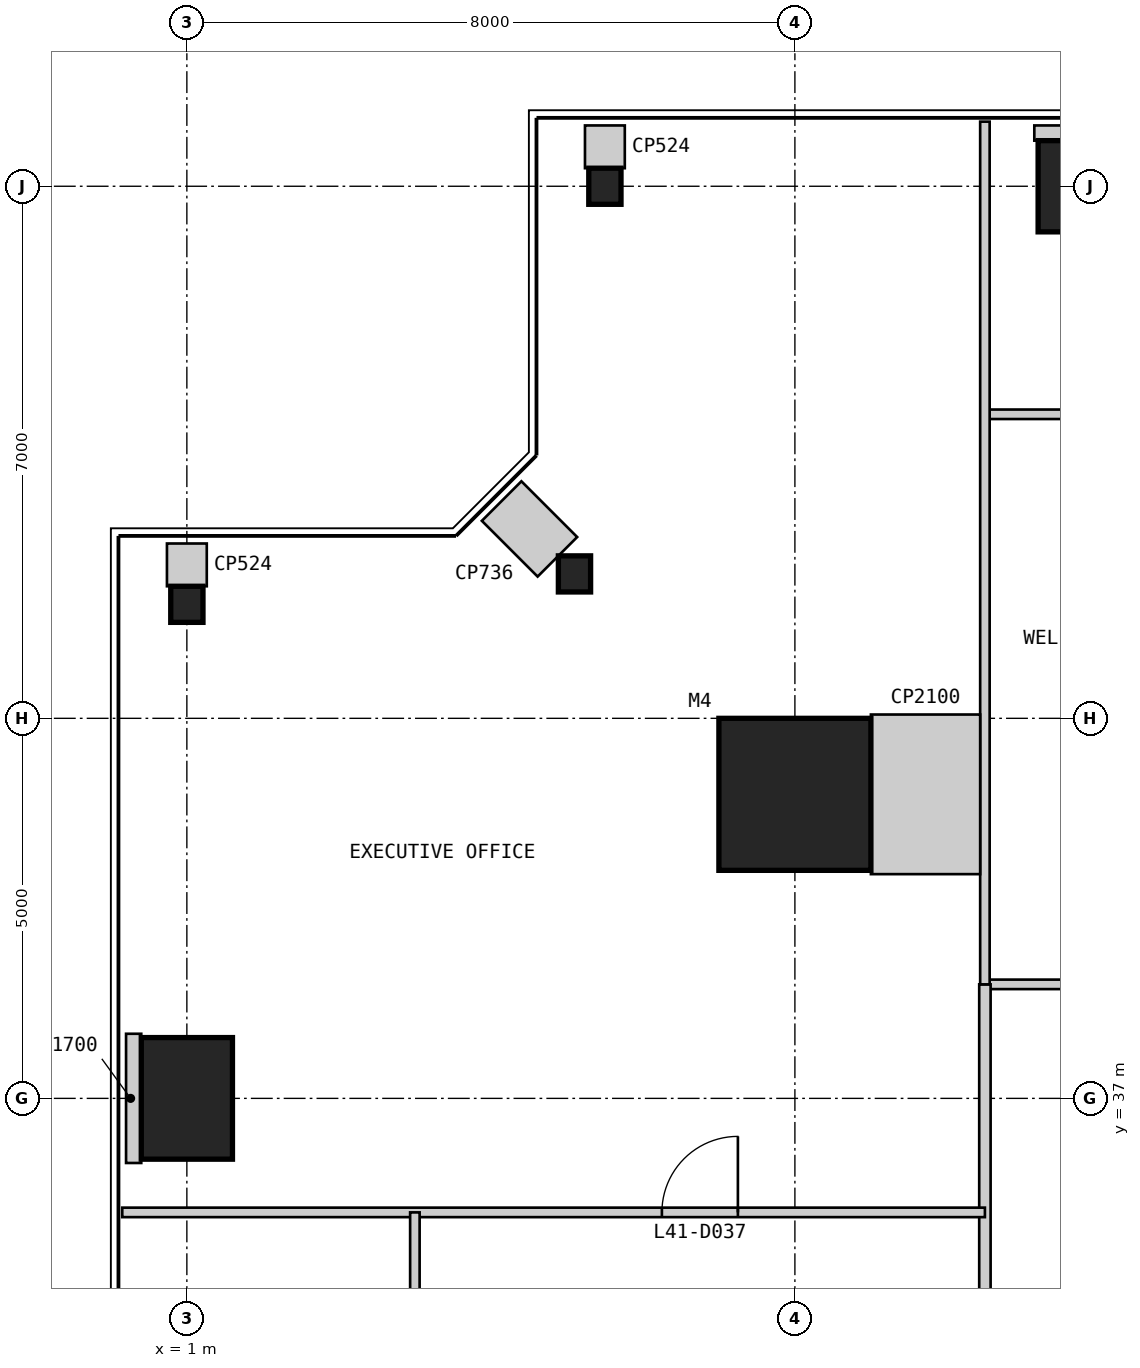
"""IFC4 building model, lengths in metres.
Left out: names, types, materials, properties, quantities, classifications, styles, units other than length and angle.
Written with IfcOpenShell. Run it as: python <this file> out.ifc"""

import sys

from ifc_helpers import new_model, si_unit, direction, frame, frame_2d, origin, origin_2d, place, context, subcontext, project, spatial, rectangle, i_section, extrude, element, fill, save


model = new_model("IFC4")
c1 = context("Model", 3, precision=1e-05, world=origin(), true_north=direction((0.0, 1.0)))
c2 = subcontext(c1, "Body", "Model", "MODEL_VIEW")
j1 = project(units=[si_unit("LENGTHUNIT", "METRE"), si_unit("PLANEANGLEUNIT", "RADIAN")], contexts=[c1])
p1 = place(None, origin())
s1 = spatial("IfcSite", under=j1, at=p1, CompositionType="ELEMENT")
p2 = place(p1, origin())
s2 = spatial("IfcBuilding", under=s1, at=p2, CompositionType="ELEMENT")
p3 = place(p2, frame((0.0, 0.0, 177.8)))
s3 = spatial("IfcBuildingStorey", under=s2, at=p3, CompositionType="ELEMENT", Elevation=177.8)
p4 = place(p3, frame((9.0, 41.0, 0.0), z_axis=(0.0, 0.0, 1.0), x_axis=(1.0, 0.0, 0.0)))
e1 = element("IfcColumn", 1, at=p4, inside=s3, PredefinedType="COLUMN", context=c2, shape_type="SweptSolid", body=[
    extrude(rectangle(XDim=2.0, YDim=2.0, at=origin_2d()), origin(), (0.0, 0.0, 1.0), 4.0),
])
p5 = place(p3, frame((13.0, 49.0, 0.0), z_axis=(0.0, 0.0, 1.0), x_axis=(1.0, 0.0, 0.0)))
e2 = element("IfcColumn", 2, at=p5, inside=s3, PredefinedType="COLUMN", context=c2, shape_type="SweptSolid", body=[
    extrude(rectangle(XDim=1.6, YDim=1.2, at=origin_2d()), origin(), (0.0, 0.0, 1.0), 4.0),
])
for number, where, z_axis, x_axis in (
    (3, (6.5, 49.0, 0.0), (0.0, 0.0, 1.0), (1.0, 0.0, 0.0)),
    (4, (6.1, 43.9, 0.0), (0.0, 0.0, 1.0), (1.0, 0.0, 0.0)),
    (5, (1.0, 43.5, 0.0), (0.0, 0.0, 1.0), (1.0, 0.0, 0.0)),
):
    element("IfcColumn", number, at=place(p3, frame(where, z_axis=z_axis, x_axis=x_axis)), inside=s3, PredefinedType="COLUMN", context=c2, shape_type="SweptSolid", body=[
        extrude(i_section(OverallWidth=0.424, OverallDepth=0.475, WebThickness=0.048, FlangeThickness=0.077, at=origin_2d()), origin(), (0.0, 0.0, 1.0), 4.0),
    ])
p6 = place(p3, frame((1.0, 37.0, 0.0), z_axis=(0.0, 0.0, 1.0), x_axis=(1.0, 0.0, 0.0)))
e6 = element("IfcColumn", 6, at=p6, inside=s3, PredefinedType="COLUMN", context=c2, shape_type="SweptSolid", body=[
    extrude(rectangle(XDim=1.2, YDim=1.6, at=origin_2d()), origin(), (0.0, 0.0, 1.0), 4.0),
])
p7 = place(p3, frame((35.5, 46.0, 0.0), z_axis=(0.0, 0.0, 1.0), x_axis=(-1.0, 0.0, 0.0)))
e7 = element("IfcWall", 7, at=p7, inside=s3, PredefinedType="PARTITIONING", context=c2, shape_type="SweptSolid", body=[
    extrude(rectangle(XDim=24.0, YDim=0.125, at=frame_2d((12.0, 0.0))), origin(), (0.0, 0.0, 1.0), 3.85),
])
p8 = place(p7, frame((16.05, 0.0, 0.0)))
e8 = element("IfcOpeningElement", 8, at=p8, cuts=e7, PredefinedType="OPENING", context=c2, shape_type="SweptSolid", body=[
    extrude(rectangle(XDim=0.9, YDim=2.2, at=frame_2d((0.45, 1.1))), frame((0.0, 0.073, 0.0), z_axis=(0.0, -1.0, 0.0), x_axis=(1.0, 0.0, 0.0)), (0.0, 0.0, 1.0), 0.145),
])
p9 = place(p7, frame((19.05, 0.0, 0.0)))
e9 = element("IfcOpeningElement", 9, at=p9, cuts=e7, PredefinedType="OPENING", context=c2, shape_type="SweptSolid", body=[
    extrude(rectangle(XDim=0.9, YDim=2.2, at=frame_2d((0.45, 1.1))), frame((0.0, 0.073, 0.0), z_axis=(0.0, -1.0, 0.0), x_axis=(1.0, 0.0, 0.0)), (0.0, 0.0, 1.0), 0.145),
])
p10 = place(p3, frame((14.5, 38.5, 0.0), z_axis=(0.0, 0.0, 1.0), x_axis=(-1.0, 0.0, 0.0)))
e10 = element("IfcWall", 10, at=p10, inside=s3, PredefinedType="PARTITIONING", context=c2, shape_type="SweptSolid", body=[
    extrude(rectangle(XDim=3.0, YDim=0.125, at=frame_2d((1.5, 0.0))), origin(), (0.0, 0.0, 1.0), 3.85),
])
p11 = place(p3, frame((11.5, 38.5, 0.0), z_axis=(0.0, 0.0, 1.0), x_axis=(0.0, -1.0, 0.0)))
e11 = element("IfcWall", 11, at=p11, inside=s3, PredefinedType="PARTITIONING", context=c2, shape_type="SweptSolid", body=[
    extrude(rectangle(XDim=27.0, YDim=0.15, at=frame_2d((13.5, 0.0))), origin(), (0.0, 0.0, 1.0), 3.85),
])
p12 = place(p11, frame((13.0, 0.0, 0.0)))
e12 = element("IfcOpeningElement", 12, at=p12, cuts=e11, PredefinedType="OPENING", context=c2, shape_type="SweptSolid", body=[
    extrude(rectangle(XDim=1.0, YDim=2.2, at=frame_2d((0.5, 1.1))), frame((0.0, 0.085, 0.0), z_axis=(0.0, -1.0, 0.0), x_axis=(1.0, 0.0, 0.0)), (0.0, 0.0, 1.0), 0.17),
])
p13 = place(p3, frame((11.5, 49.85, 0.0), z_axis=(0.0, 0.0, 1.0), x_axis=(0.0, -1.0, 0.0)))
e13 = element("IfcWall", 13, at=p13, inside=s3, PredefinedType="PARTITIONING", context=c2, shape_type="SweptSolid", body=[
    extrude(rectangle(XDim=11.35, YDim=0.125, at=frame_2d((5.675, 0.0))), origin(), (0.0, 0.0, 1.0), 3.85),
])
p14 = place(p3, frame((0.15, 35.5, 0.0), z_axis=(0.0, 0.0, 1.0), x_axis=(1.0, 0.0, 0.0)))
e14 = element("IfcWall", 14, at=p14, inside=s3, PredefinedType="PARTITIONING", context=c2, shape_type="SweptSolid", body=[
    extrude(rectangle(XDim=11.35, YDim=0.125, at=frame_2d((5.675, 0.0))), origin(), (0.0, 0.0, 1.0), 3.85),
])
p15 = place(p14, frame((7.1, 0.0, 0.0)))
e15 = element("IfcOpeningElement", 15, at=p15, cuts=e14, PredefinedType="OPENING", context=c2, shape_type="SweptSolid", body=[
    extrude(rectangle(XDim=1.0, YDim=2.2, at=frame_2d((0.5, 1.1))), frame((0.0, 0.073, 0.0), z_axis=(0.0, -1.0, 0.0), x_axis=(1.0, 0.0, 0.0)), (0.0, 0.0, 1.0), 0.145),
])
p16 = place(p3, frame((4.0, 35.5, 0.0), z_axis=(0.0, 0.0, 1.0), x_axis=(0.0, -1.0, 0.0)))
e16 = element("IfcWall", 16, at=p16, inside=s3, PredefinedType="PARTITIONING", context=c2, shape_type="SweptSolid", body=[
    extrude(rectangle(XDim=24.0, YDim=0.125, at=frame_2d((12.0, 0.0))), origin(), (0.0, 0.0, 1.0), 3.238),
])
p17 = place(p16, frame((4.05, 0.0, 0.0)))
e17 = element("IfcOpeningElement", 17, at=p17, cuts=e16, PredefinedType="OPENING", context=c2, shape_type="SweptSolid", body=[
    extrude(rectangle(XDim=0.9, YDim=2.2, at=frame_2d((0.45, 1.1))), frame((0.0, 0.073, 0.0), z_axis=(0.0, -1.0, 0.0), x_axis=(1.0, 0.0, 0.0)), (0.0, 0.0, 1.0), 0.145),
])
p18 = place(p16, frame((10.05, 0.0, 0.0)))
e18 = element("IfcOpeningElement", 18, at=p18, cuts=e16, PredefinedType="OPENING", context=c2, shape_type="SweptSolid", body=[
    extrude(rectangle(XDim=0.9, YDim=2.2, at=frame_2d((0.45, 1.1))), frame((0.0, 0.073, 0.0), z_axis=(0.0, -1.0, 0.0), x_axis=(1.0, 0.0, 0.0)), (0.0, 0.0, 1.0), 0.145),
])
p19 = place(p16, frame((16.05, 0.0, 0.0)))
e19 = element("IfcOpeningElement", 19, at=p19, cuts=e16, PredefinedType="OPENING", context=c2, shape_type="SweptSolid", body=[
    extrude(rectangle(XDim=0.9, YDim=2.2, at=frame_2d((0.45, 1.1))), frame((0.0, 0.073, 0.0), z_axis=(0.0, -1.0, 0.0), x_axis=(1.0, 0.0, 0.0)), (0.0, 0.0, 1.0), 0.145),
])
p20 = place(p16, frame((19.0, 0.0, 0.0)))
e20 = element("IfcOpeningElement", 20, at=p20, cuts=e16, PredefinedType="OPENING", context=c2, shape_type="SweptSolid", body=[
    extrude(rectangle(XDim=1.0, YDim=2.2, at=frame_2d((0.5, 1.1))), frame((0.0, 0.073, 0.0), z_axis=(0.0, -1.0, 0.0), x_axis=(1.0, 0.0, 0.0)), (0.0, 0.0, 1.0), 0.145),
])
p21 = place(p3, frame((13.0, 49.8, 0.0), z_axis=(0.0, 0.0, 1.0), x_axis=(0.0, -1.0, 0.0)))
e21 = element("IfcWall", 21, at=p21, inside=s3, PredefinedType="PARTITIONING", context=c2, shape_type="SweptSolid", body=[
    extrude(rectangle(XDim=0.2, YDim=1.7, at=frame_2d((0.1, 0.0))), origin(), (0.0, 0.0, 1.0), 3.85),
])
p22 = place(p3, frame((11.438, 41.0, 0.0), z_axis=(0.0, 0.0, 1.0), x_axis=(-1.0, 0.0, 0.0)))
e22 = element("IfcWall", 22, at=p22, inside=s3, PredefinedType="PARTITIONING", context=c2, shape_type="SweptSolid", body=[
    extrude(rectangle(XDim=1.438, YDim=2.1, at=frame_2d((0.719, 0.0))), origin(), (0.0, 0.0, 1.0), 3.85),
])
p23 = place(p3, frame((6.5, 49.8, 0.0), z_axis=(0.0, 0.0, 1.0), x_axis=(0.0, -1.0, 0.0)))
e23 = element("IfcWall", 23, at=p23, inside=s3, PredefinedType="PARTITIONING", context=c2, shape_type="SweptSolid", body=[
    extrude(rectangle(XDim=0.562, YDim=0.524, at=frame_2d((0.281, 0.0))), origin(), (0.0, 0.0, 1.0), 3.85),
])
p24 = place(p3, frame((5.141, 44.859, 0.0), z_axis=(0.0, 0.0, 1.0), x_axis=(0.707106781187, -0.707106781187, 0.0)))
e24 = element("IfcWall", 24, at=p24, inside=s3, PredefinedType="PARTITIONING", context=c2, shape_type="SweptSolid", body=[
    extrude(rectangle(XDim=1.038, YDim=0.736, at=frame_2d((0.519, 0.0))), origin(), (0.0, 0.0, 1.0), 3.85),
])
p25 = place(p3, frame((1.0, 44.3, 0.0), z_axis=(0.0, 0.0, 1.0), x_axis=(0.0, -1.0, 0.0)))
e25 = element("IfcWall", 25, at=p25, inside=s3, PredefinedType="PARTITIONING", context=c2, shape_type="SweptSolid", body=[
    extrude(rectangle(XDim=0.562, YDim=0.524, at=frame_2d((0.281, 0.0))), origin(), (0.0, 0.0, 1.0), 3.85),
])
p26 = place(p3, frame((0.2, 37.0, 0.0), z_axis=(0.0, 0.0, 1.0), x_axis=(1.0, 0.0, 0.0)))
e26 = element("IfcWall", 26, at=p26, inside=s3, PredefinedType="PARTITIONING", context=c2, shape_type="SweptSolid", body=[
    extrude(rectangle(XDim=0.2, YDim=1.7, at=frame_2d((0.1, 0.0))), origin(), (0.0, 0.0, 1.0), 3.85),
])
p27 = place(p15, origin())
e27 = element("IfcDoor", 27, at=p27, inside=s3, OperationType="SINGLE_SWING_RIGHT", PredefinedType="DOOR", context=c2, shape_type="SweptSolid", body=[
    extrude(rectangle(XDim=1.0, YDim=2.2, at=frame_2d((0.5, 1.1))), frame((0.0, 0.025, 0.0), z_axis=(0.0, -1.0, 0.0), x_axis=(1.0, 0.0, 0.0)), (0.0, 0.0, 1.0), 0.05),
])
fill(e15, e27)
save(model, sys.argv[1])
